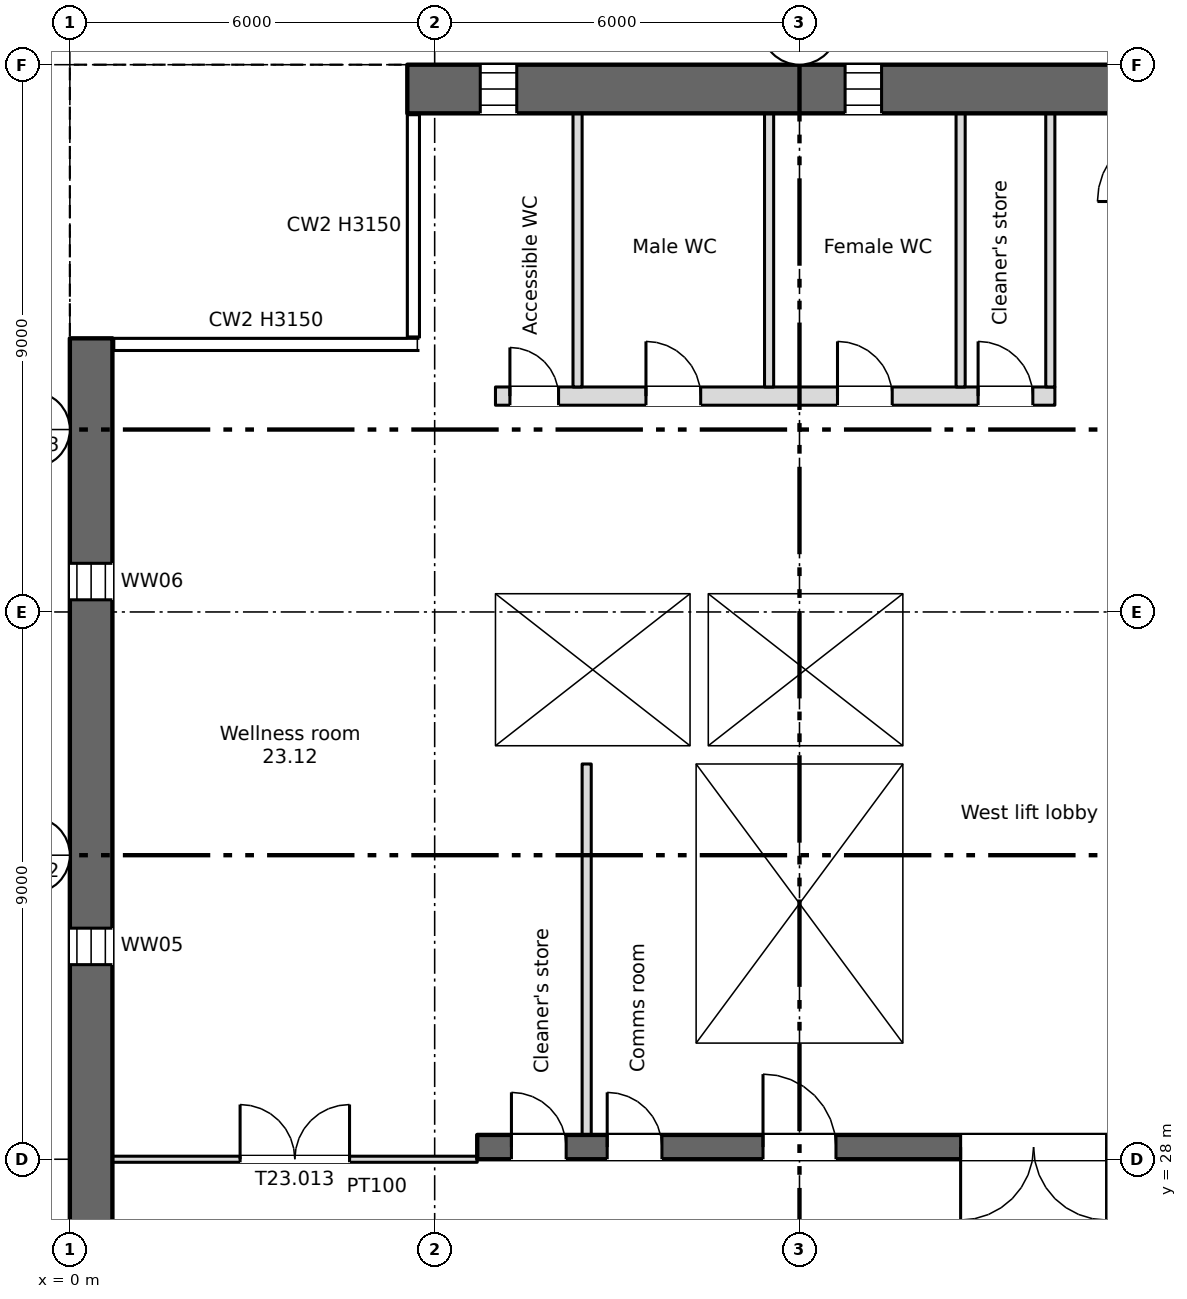
"""IFC4 building model, lengths in metres.
Left out: names, types, materials, properties, quantities, classifications, styles, units other than length and angle.
Written with IfcOpenShell. Run it as: python <this file> out.ifc"""

import sys

from ifc_helpers import new_model, si_unit, direction, frame, frame_2d, origin, place, context, subcontext, project, spatial, rectangle, extrude, element, fill, save


model = new_model("IFC4")
c1 = context("Model", 3, precision=1e-05, world=origin(), true_north=direction((0.0, 1.0)))
c2 = subcontext(c1, "Body", "Model", "MODEL_VIEW")
j1 = project(units=[si_unit("LENGTHUNIT", "METRE"), si_unit("PLANEANGLEUNIT", "RADIAN")], contexts=[c1])
p1 = place(None, origin())
s1 = spatial("IfcSite", under=j1, at=p1, CompositionType="ELEMENT")
p2 = place(p1, origin())
s2 = spatial("IfcBuilding", under=s1, at=p2, CompositionType="ELEMENT")
p3 = place(p2, frame((0.0, 0.0, 155.0)))
s3 = spatial("IfcBuildingStorey", under=s2, at=p3, CompositionType="ELEMENT", Elevation=155.0)
p4 = place(p3, frame((0.35, 6.0, 0.0), z_axis=(0.0, 0.0, 1.0), x_axis=(0.0, 1.0, 0.0)))
e1 = element("IfcWall", 1, at=p4, inside=s3, PredefinedType="SHEAR", context=c2, shape_type="SweptSolid", body=[
    extrude(rectangle(XDim=35.5, YDim=0.7, at=frame_2d((17.75, 0.0))), origin(), (0.0, 0.0, 1.0), 3.15),
])
p5 = place(p4, frame((1.2, 0.0, 0.6)))
e2 = element("IfcOpeningElement", 2, at=p5, cuts=e1, PredefinedType="OPENING", context=c2, shape_type="SweptSolid", body=[
    extrude(rectangle(XDim=0.6, YDim=2.4, at=frame_2d((0.3, 1.2))), frame((0.0, 0.36, 0.0), z_axis=(0.0, -1.0, 0.0), x_axis=(1.0, 0.0, 0.0)), (0.0, 0.0, 1.0), 0.72),
])
p6 = place(p4, frame((7.2, 0.0, 0.6)))
e3 = element("IfcOpeningElement", 3, at=p6, cuts=e1, PredefinedType="OPENING", context=c2, shape_type="SweptSolid", body=[
    extrude(rectangle(XDim=0.6, YDim=2.4, at=frame_2d((0.3, 1.2))), frame((0.0, 0.36, 0.0), z_axis=(0.0, -1.0, 0.0), x_axis=(1.0, 0.0, 0.0)), (0.0, 0.0, 1.0), 0.72),
])
p7 = place(p4, frame((13.2, 0.0, 0.6)))
e4 = element("IfcOpeningElement", 4, at=p7, cuts=e1, PredefinedType="OPENING", context=c2, shape_type="SweptSolid", body=[
    extrude(rectangle(XDim=0.6, YDim=2.4, at=frame_2d((0.3, 1.2))), frame((0.0, 0.36, 0.0), z_axis=(0.0, -1.0, 0.0), x_axis=(1.0, 0.0, 0.0)), (0.0, 0.0, 1.0), 0.72),
])
p8 = place(p4, frame((19.2, 0.0, 0.6)))
e5 = element("IfcOpeningElement", 5, at=p8, cuts=e1, PredefinedType="OPENING", context=c2, shape_type="SweptSolid", body=[
    extrude(rectangle(XDim=0.6, YDim=2.4, at=frame_2d((0.3, 1.2))), frame((0.0, 0.36, 0.0), z_axis=(0.0, -1.0, 0.0), x_axis=(1.0, 0.0, 0.0)), (0.0, 0.0, 1.0), 0.72),
])
p9 = place(p4, frame((25.2, 0.0, 0.6)))
e6 = element("IfcOpeningElement", 6, at=p9, cuts=e1, PredefinedType="OPENING", context=c2, shape_type="SweptSolid", body=[
    extrude(rectangle(XDim=0.6, YDim=2.4, at=frame_2d((0.3, 1.2))), frame((0.0, 0.36, 0.0), z_axis=(0.0, -1.0, 0.0), x_axis=(1.0, 0.0, 0.0)), (0.0, 0.0, 1.0), 0.72),
])
p10 = place(p4, frame((31.2, 0.0, 0.6)))
e7 = element("IfcOpeningElement", 7, at=p10, cuts=e1, PredefinedType="OPENING", context=c2, shape_type="SweptSolid", body=[
    extrude(rectangle(XDim=0.6, YDim=2.4, at=frame_2d((0.3, 1.2))), frame((0.0, 0.36, 0.0), z_axis=(0.0, -1.0, 0.0), x_axis=(1.0, 0.0, 0.0)), (0.0, 0.0, 1.0), 0.72),
])
p11 = place(p3, frame((5.55, 45.6, 0.0), z_axis=(0.0, 0.0, 1.0), x_axis=(1.0, 0.0, 0.0)))
e8 = element("IfcWall", 8, at=p11, inside=s3, PredefinedType="SHEAR", context=c2, shape_type="SweptSolid", body=[
    extrude(rectangle(XDim=60.9, YDim=0.8, at=frame_2d((30.45, 0.0))), origin(), (0.0, 0.0, 1.0), 3.15),
])
p12 = place(p11, frame((1.2, 0.0, 0.6)))
e9 = element("IfcOpeningElement", 9, at=p12, cuts=e8, PredefinedType="OPENING", context=c2, shape_type="SweptSolid", body=[
    extrude(rectangle(XDim=0.6, YDim=2.4, at=frame_2d((0.3, 1.2))), frame((0.0, 0.41, 0.0), z_axis=(0.0, -1.0, 0.0), x_axis=(1.0, 0.0, 0.0)), (0.0, 0.0, 1.0), 0.82),
])
p13 = place(p11, frame((7.2, 0.0, 0.6)))
e10 = element("IfcOpeningElement", 10, at=p13, cuts=e8, PredefinedType="OPENING", context=c2, shape_type="SweptSolid", body=[
    extrude(rectangle(XDim=0.6, YDim=2.4, at=frame_2d((0.3, 1.2))), frame((0.0, 0.41, 0.0), z_axis=(0.0, -1.0, 0.0), x_axis=(1.0, 0.0, 0.0)), (0.0, 0.0, 1.0), 0.82),
])
p14 = place(p3, frame((6.7, 28.2, 0.0), z_axis=(0.0, 0.0, 1.0), x_axis=(1.0, 0.0, 0.0)))
e11 = element("IfcWall", 11, at=p14, inside=s3, PredefinedType="SHEAR", context=c2, shape_type="SweptSolid", body=[
    extrude(rectangle(XDim=57.8, YDim=0.4, at=frame_2d((28.9, 0.0))), origin(), (0.0, 0.0, 1.0), 3.15),
])
p15 = place(p14, frame((12.562, 0.0, 0.0)))
e12 = element("IfcOpeningElement", 12, at=p15, cuts=e11, PredefinedType="OPENING", context=c2, shape_type="SweptSolid", body=[
    extrude(rectangle(XDim=0.9, YDim=2.1, at=frame_2d((0.45, 1.05))), frame((0.0, 0.21, 0.0), z_axis=(0.0, -1.0, 0.0), x_axis=(1.0, 0.0, 0.0)), (0.0, 0.0, 1.0), 0.42),
])
p16 = place(p14, frame((15.137, 0.0, 0.0)))
e13 = element("IfcOpeningElement", 13, at=p16, cuts=e11, PredefinedType="OPENING", context=c2, shape_type="SweptSolid", body=[
    extrude(rectangle(XDim=0.9, YDim=2.1, at=frame_2d((0.45, 1.05))), frame((0.0, 0.21, 0.0), z_axis=(0.0, -1.0, 0.0), x_axis=(1.0, 0.0, 0.0)), (0.0, 0.0, 1.0), 0.42),
])
p17 = place(p14, frame((49.85, 0.0, 0.0)))
e14 = element("IfcOpeningElement", 14, at=p17, cuts=e11, PredefinedType="OPENING", context=c2, shape_type="SweptSolid", body=[
    extrude(rectangle(XDim=0.9, YDim=2.1, at=frame_2d((0.45, 1.05))), frame((0.0, 0.21, 0.0), z_axis=(0.0, -1.0, 0.0), x_axis=(1.0, 0.0, 0.0)), (0.0, 0.0, 1.0), 0.42),
])
p18 = place(p14, frame((0.562, 0.0, 0.0)))
e15 = element("IfcOpeningElement", 15, at=p18, cuts=e11, PredefinedType="OPENING", context=c2, shape_type="SweptSolid", body=[
    extrude(rectangle(XDim=0.9, YDim=2.1, at=frame_2d((0.45, 1.05))), frame((0.0, 0.21, 0.0), z_axis=(0.0, -1.0, 0.0), x_axis=(1.0, 0.0, 0.0)), (0.0, 0.0, 1.0), 0.42),
])
p19 = place(p14, frame((2.137, 0.0, 0.0)))
e16 = element("IfcOpeningElement", 16, at=p19, cuts=e11, PredefinedType="OPENING", context=c2, shape_type="SweptSolid", body=[
    extrude(rectangle(XDim=0.9, YDim=2.1, at=frame_2d((0.45, 1.05))), frame((0.0, 0.21, 0.0), z_axis=(0.0, -1.0, 0.0), x_axis=(1.0, 0.0, 0.0)), (0.0, 0.0, 1.0), 0.42),
])
p20 = place(p14, frame((4.7, 0.0, 0.0)))
e17 = element("IfcOpeningElement", 17, at=p20, cuts=e11, PredefinedType="OPENING", context=c2, shape_type="SweptSolid", body=[
    extrude(rectangle(XDim=1.2, YDim=2.1, at=frame_2d((0.6, 1.05))), frame((0.0, 0.21, 0.0), z_axis=(0.0, -1.0, 0.0), x_axis=(1.0, 0.0, 0.0)), (0.0, 0.0, 1.0), 0.42),
])
p21 = place(p14, frame((31.7, 0.0, 0.0)))
e18 = element("IfcOpeningElement", 18, at=p21, cuts=e11, PredefinedType="OPENING", context=c2, shape_type="SweptSolid", body=[
    extrude(rectangle(XDim=1.2, YDim=2.1, at=frame_2d((0.6, 1.05))), frame((0.0, 0.21, 0.0), z_axis=(0.0, -1.0, 0.0), x_axis=(1.0, 0.0, 0.0)), (0.0, 0.0, 1.0), 0.42),
])
p22 = place(p14, frame((55.2, 0.0, 0.0)))
e19 = element("IfcOpeningElement", 19, at=p22, cuts=e11, PredefinedType="OPENING", context=c2, shape_type="SweptSolid", body=[
    extrude(rectangle(XDim=1.2, YDim=2.1, at=frame_2d((0.6, 1.05))), frame((0.0, 0.21, 0.0), z_axis=(0.0, -1.0, 0.0), x_axis=(1.0, 0.0, 0.0)), (0.0, 0.0, 1.0), 0.42),
])
p23 = place(p14, frame((21.7, 0.0, 0.0)))
e20 = element("IfcOpeningElement", 20, at=p23, cuts=e11, PredefinedType="OPENING", context=c2, shape_type="SweptSolid", body=[
    extrude(rectangle(XDim=1.2, YDim=2.1, at=frame_2d((0.6, 1.05))), frame((0.0, 0.21, 0.0), z_axis=(0.0, -1.0, 0.0), x_axis=(1.0, 0.0, 0.0)), (0.0, 0.0, 1.0), 0.42),
])
p24 = place(p14, frame((41.7, 0.0, 0.0)))
e21 = element("IfcOpeningElement", 21, at=p24, cuts=e11, PredefinedType="OPENING", context=c2, shape_type="SweptSolid", body=[
    extrude(rectangle(XDim=1.2, YDim=2.1, at=frame_2d((0.6, 1.05))), frame((0.0, 0.21, 0.0), z_axis=(0.0, -1.0, 0.0), x_axis=(1.0, 0.0, 0.0)), (0.0, 0.0, 1.0), 0.42),
])
p25 = place(p14, frame((24.85, 0.0, 0.0)))
e22 = element("IfcOpeningElement", 22, at=p25, cuts=e11, PredefinedType="OPENING", context=c2, shape_type="SweptSolid", body=[
    extrude(rectangle(XDim=2.4, YDim=2.1, at=frame_2d((1.2, 1.05))), frame((0.0, 0.21, 0.0), z_axis=(0.0, -1.0, 0.0), x_axis=(1.0, 0.0, 0.0)), (0.0, 0.0, 1.0), 0.42),
])
p26 = place(p14, frame((37.35, 0.0, 0.0)))
e23 = element("IfcOpeningElement", 23, at=p26, cuts=e11, PredefinedType="OPENING", context=c2, shape_type="SweptSolid", body=[
    extrude(rectangle(XDim=2.4, YDim=2.1, at=frame_2d((1.2, 1.05))), frame((0.0, 0.21, 0.0), z_axis=(0.0, -1.0, 0.0), x_axis=(1.0, 0.0, 0.0)), (0.0, 0.0, 1.0), 0.42),
])
p27 = place(p14, frame((7.95, 0.0, 0.0)))
e24 = element("IfcOpeningElement", 24, at=p27, cuts=e11, PredefinedType="OPENING", context=c2, shape_type="SweptSolid", body=[
    extrude(rectangle(XDim=2.4, YDim=2.1, at=frame_2d((1.2, 1.05))), frame((0.0, 0.21, 0.0), z_axis=(0.0, -1.0, 0.0), x_axis=(1.0, 0.0, 0.0)), (0.0, 0.0, 1.0), 0.42),
])
p28 = place(p14, frame((28.85, 0.0, 0.0)))
e25 = element("IfcOpeningElement", 25, at=p28, cuts=e11, PredefinedType="OPENING", context=c2, shape_type="SweptSolid", body=[
    extrude(rectangle(XDim=0.9, YDim=2.1, at=frame_2d((0.45, 1.05))), frame((0.0, 0.21, 0.0), z_axis=(0.0, -1.0, 0.0), x_axis=(1.0, 0.0, 0.0)), (0.0, 0.0, 1.0), 0.42),
])
p29 = place(p14, frame((34.85, 0.0, 0.0)))
e26 = element("IfcOpeningElement", 26, at=p29, cuts=e11, PredefinedType="OPENING", context=c2, shape_type="SweptSolid", body=[
    extrude(rectangle(XDim=0.9, YDim=2.1, at=frame_2d((0.45, 1.05))), frame((0.0, 0.21, 0.0), z_axis=(0.0, -1.0, 0.0), x_axis=(1.0, 0.0, 0.0)), (0.0, 0.0, 1.0), 0.42),
])
p30 = place(p3, frame((6.85, 28.4, 0.0), z_axis=(0.0, 0.0, 1.0), x_axis=(0.0, 1.0, 0.0)))
e27 = element("IfcWall", 27, at=p30, inside=s3, PredefinedType="SHEAR", context=c2, shape_type="SweptSolid", body=[
    extrude(rectangle(XDim=16.8, YDim=0.3, at=frame_2d((8.4, 0.0))), origin(), (0.0, 0.0, 1.0), 3.15),
])
for number, where, z_axis, x_axis in (
    (28, (10.15, 28.4, 0.0), (0.0, 0.0, 1.0), (0.0, 1.0, 0.0)),
    (29, (13.85, 28.4, 0.0), (0.0, 0.0, 1.0), (0.0, 1.0, 0.0)),
):
    element("IfcWall", number, at=place(p3, frame(where, z_axis=z_axis, x_axis=x_axis)), inside=s3, PredefinedType="SHEAR", context=c2, shape_type="SweptSolid", body=[
        extrude(rectangle(XDim=6.1, YDim=0.3, at=frame_2d((3.05, 0.0))), origin(), (0.0, 0.0, 1.0), 3.15),
    ])
for number, where, z_axis, x_axis in (
    (30, (7.0, 34.65, 0.0), (0.0, 0.0, 1.0), (1.0, 0.0, 0.0)),
    (31, (7.0, 37.45, 0.0), (0.0, 0.0, 1.0), (1.0, 0.0, 0.0)),
):
    element("IfcWall", number, at=place(p3, frame(where, z_axis=z_axis, x_axis=x_axis)), inside=s3, PredefinedType="SHEAR", context=c2, shape_type="SweptSolid", body=[
        extrude(rectangle(XDim=7.0, YDim=0.3, at=frame_2d((3.5, 0.0))), origin(), (0.0, 0.0, 1.0), 3.15),
    ])
p31 = place(p3, frame((13.85, 34.8, 0.0), z_axis=(0.0, 0.0, 1.0), x_axis=(0.0, 1.0, 0.0)))
e32 = element("IfcWall", 32, at=p31, inside=s3, PredefinedType="SHEAR", context=c2, shape_type="SweptSolid", body=[
    extrude(rectangle(XDim=2.5, YDim=0.3, at=frame_2d((1.25, 0.0))), origin(), (0.0, 0.0, 1.0), 3.15),
])
p32 = place(p3, frame((7.0, 40.55, 0.0), z_axis=(0.0, 0.0, 1.0), x_axis=(1.0, 0.0, 0.0)))
e33 = element("IfcWall", 33, at=p32, inside=s3, PredefinedType="PARTITIONING", context=c2, shape_type="SweptSolid", body=[
    extrude(rectangle(XDim=9.2, YDim=0.3, at=frame_2d((4.6, 0.0))), origin(), (0.0, 0.0, 1.0), 3.15),
])
p33 = place(p32, frame((0.238, 0.0, 0.0)))
e34 = element("IfcOpeningElement", 34, at=p33, cuts=e33, PredefinedType="OPENING", context=c2, shape_type="SweptSolid", body=[
    extrude(rectangle(XDim=0.8, YDim=2.1, at=frame_2d((0.4, 1.05))), frame((0.0, 0.16, 0.0), z_axis=(0.0, -1.0, 0.0), x_axis=(1.0, 0.0, 0.0)), (0.0, 0.0, 1.0), 0.32),
])
p34 = place(p32, frame((2.475, 0.0, 0.0)))
e35 = element("IfcOpeningElement", 35, at=p34, cuts=e33, PredefinedType="OPENING", context=c2, shape_type="SweptSolid", body=[
    extrude(rectangle(XDim=0.9, YDim=2.1, at=frame_2d((0.45, 1.05))), frame((0.0, 0.16, 0.0), z_axis=(0.0, -1.0, 0.0), x_axis=(1.0, 0.0, 0.0)), (0.0, 0.0, 1.0), 0.32),
])
p35 = place(p32, frame((5.625, 0.0, 0.0)))
e36 = element("IfcOpeningElement", 36, at=p35, cuts=e33, PredefinedType="OPENING", context=c2, shape_type="SweptSolid", body=[
    extrude(rectangle(XDim=0.9, YDim=2.1, at=frame_2d((0.45, 1.05))), frame((0.0, 0.16, 0.0), z_axis=(0.0, -1.0, 0.0), x_axis=(1.0, 0.0, 0.0)), (0.0, 0.0, 1.0), 0.32),
])
p36 = place(p32, frame((7.938, 0.0, 0.0)))
e37 = element("IfcOpeningElement", 37, at=p36, cuts=e33, PredefinedType="OPENING", context=c2, shape_type="SweptSolid", body=[
    extrude(rectangle(XDim=0.9, YDim=2.1, at=frame_2d((0.45, 1.05))), frame((0.0, 0.16, 0.0), z_axis=(0.0, -1.0, 0.0), x_axis=(1.0, 0.0, 0.0)), (0.0, 0.0, 1.0), 0.32),
])
p37 = place(p3, frame((10.35, 34.8, 0.0), z_axis=(0.0, 0.0, 1.0), x_axis=(0.0, 1.0, 0.0)))
e38 = element("IfcWall", 38, at=p37, inside=s3, PredefinedType="SHEAR", context=c2, shape_type="SweptSolid", body=[
    extrude(rectangle(XDim=2.5, YDim=0.3, at=frame_2d((1.25, 0.0))), origin(), (0.0, 0.0, 1.0), 3.15),
])
p38 = place(p3, frame((16.125, 40.7, 0.0), z_axis=(0.0, 0.0, 1.0), x_axis=(0.0, 1.0, 0.0)))
e39 = element("IfcWall", 39, at=p38, inside=s3, PredefinedType="PARTITIONING", context=c2, shape_type="SweptSolid", body=[
    extrude(rectangle(XDim=4.5, YDim=0.15, at=frame_2d((2.25, 0.0))), origin(), (0.0, 0.0, 1.0), 3.15),
])
p39 = place(p3, frame((8.5, 28.4, 0.0), z_axis=(0.0, 0.0, 1.0), x_axis=(0.0, 1.0, 0.0)))
e40 = element("IfcWall", 40, at=p39, inside=s3, PredefinedType="PARTITIONING", context=c2, shape_type="SweptSolid", body=[
    extrude(rectangle(XDim=6.1, YDim=0.15, at=frame_2d((3.05, 0.0))), origin(), (0.0, 0.0, 1.0), 3.15),
])
for number, where, z_axis, x_axis in (
    (41, (8.35, 40.7, 0.0), (0.0, 0.0, 1.0), (0.0, 1.0, 0.0)),
    (42, (11.5, 40.7, 0.0), (0.0, 0.0, 1.0), (0.0, 1.0, 0.0)),
    (43, (14.65, 40.7, 0.0), (0.0, 0.0, 1.0), (0.0, 1.0, 0.0)),
):
    element("IfcWall", number, at=place(p3, frame(where, z_axis=z_axis, x_axis=x_axis)), inside=s3, PredefinedType="PARTITIONING", context=c2, shape_type="SweptSolid", body=[
        extrude(rectangle(XDim=4.5, YDim=0.15, at=frame_2d((2.25, 0.0))), origin(), (0.0, 0.0, 1.0), 3.15),
    ])
p40 = place(p3, frame((0.7, 28.0, 0.0), z_axis=(0.0, 0.0, 1.0), x_axis=(1.0, 0.0, 0.0)))
e44 = element("IfcWall", 44, at=p40, inside=s3, PredefinedType="PARTITIONING", context=c2, shape_type="SweptSolid", body=[
    extrude(rectangle(XDim=6.0, YDim=0.1, at=frame_2d((3.0, 0.0))), origin(), (0.0, 0.0, 1.0), 3.15),
])
p41 = place(p40, frame((2.1, 0.0, 0.0)))
e45 = element("IfcOpeningElement", 45, at=p41, cuts=e44, PredefinedType="OPENING", context=c2, shape_type="SweptSolid", body=[
    extrude(rectangle(XDim=1.8, YDim=2.1, at=frame_2d((0.9, 1.05))), frame((0.0, 0.06, 0.0), z_axis=(0.0, -1.0, 0.0), x_axis=(1.0, 0.0, 0.0)), (0.0, 0.0, 1.0), 0.12),
])
p42 = place(p12, origin())
e46 = element("IfcWindow", 46, at=p42, inside=s3, PartitioningType="SINGLE_PANEL", PredefinedType="WINDOW", context=c2, shape_type="SweptSolid", body=[
    extrude(rectangle(XDim=0.6, YDim=2.4, at=frame_2d((0.3, 1.2))), frame((0.0, 0.03, 0.0), z_axis=(0.0, -1.0, 0.0), x_axis=(1.0, 0.0, 0.0)), (0.0, 0.0, 1.0), 0.06),
])
fill(e9, e46)
p43 = place(p13, origin())
e47 = element("IfcWindow", 47, at=p43, inside=s3, PartitioningType="SINGLE_PANEL", PredefinedType="WINDOW", context=c2, shape_type="SweptSolid", body=[
    extrude(rectangle(XDim=0.6, YDim=2.4, at=frame_2d((0.3, 1.2))), frame((0.0, 0.03, 0.0), z_axis=(0.0, -1.0, 0.0), x_axis=(1.0, 0.0, 0.0)), (0.0, 0.0, 1.0), 0.06),
])
fill(e10, e47)
p44 = place(p9, origin())
e48 = element("IfcWindow", 48, at=p44, inside=s3, PartitioningType="SINGLE_PANEL", PredefinedType="WINDOW", context=c2, shape_type="SweptSolid", body=[
    extrude(rectangle(XDim=0.6, YDim=2.4, at=frame_2d((0.3, 1.2))), frame((0.0, 0.03, 0.0), z_axis=(0.0, -1.0, 0.0), x_axis=(1.0, 0.0, 0.0)), (0.0, 0.0, 1.0), 0.06),
])
fill(e6, e48)
p45 = place(p10, origin())
e49 = element("IfcWindow", 49, at=p45, inside=s3, PartitioningType="SINGLE_PANEL", PredefinedType="WINDOW", context=c2, shape_type="SweptSolid", body=[
    extrude(rectangle(XDim=0.6, YDim=2.4, at=frame_2d((0.3, 1.2))), frame((0.0, 0.03, 0.0), z_axis=(0.0, -1.0, 0.0), x_axis=(1.0, 0.0, 0.0)), (0.0, 0.0, 1.0), 0.06),
])
fill(e7, e49)
p46 = place(p18, origin())
e50 = element("IfcDoor", 50, at=p46, inside=s3, OperationType="SINGLE_SWING_LEFT", PredefinedType="DOOR", context=c2, shape_type="SweptSolid", body=[
    extrude(rectangle(XDim=0.9, YDim=2.1, at=frame_2d((0.45, 1.05))), frame((0.0, 0.025, 0.0), z_axis=(0.0, -1.0, 0.0), x_axis=(1.0, 0.0, 0.0)), (0.0, 0.0, 1.0), 0.05),
])
fill(e15, e50)
p47 = place(p19, origin())
e51 = element("IfcDoor", 51, at=p47, inside=s3, OperationType="SINGLE_SWING_LEFT", PredefinedType="DOOR", context=c2, shape_type="SweptSolid", body=[
    extrude(rectangle(XDim=0.9, YDim=2.1, at=frame_2d((0.45, 1.05))), frame((0.0, 0.025, 0.0), z_axis=(0.0, -1.0, 0.0), x_axis=(1.0, 0.0, 0.0)), (0.0, 0.0, 1.0), 0.05),
])
fill(e16, e51)
p48 = place(p33, origin())
e52 = element("IfcDoor", 52, at=p48, inside=s3, OperationType="SINGLE_SWING_LEFT", PredefinedType="DOOR", context=c2, shape_type="SweptSolid", body=[
    extrude(rectangle(XDim=0.8, YDim=2.1, at=frame_2d((0.4, 1.05))), frame((0.0, 0.025, 0.0), z_axis=(0.0, -1.0, 0.0), x_axis=(1.0, 0.0, 0.0)), (0.0, 0.0, 1.0), 0.05),
])
fill(e34, e52)
p49 = place(p34, origin())
e53 = element("IfcDoor", 53, at=p49, inside=s3, OperationType="SINGLE_SWING_LEFT", PredefinedType="DOOR", context=c2, shape_type="SweptSolid", body=[
    extrude(rectangle(XDim=0.9, YDim=2.1, at=frame_2d((0.45, 1.05))), frame((0.0, 0.025, 0.0), z_axis=(0.0, -1.0, 0.0), x_axis=(1.0, 0.0, 0.0)), (0.0, 0.0, 1.0), 0.05),
])
fill(e35, e53)
p50 = place(p35, origin())
e54 = element("IfcDoor", 54, at=p50, inside=s3, OperationType="SINGLE_SWING_LEFT", PredefinedType="DOOR", context=c2, shape_type="SweptSolid", body=[
    extrude(rectangle(XDim=0.9, YDim=2.1, at=frame_2d((0.45, 1.05))), frame((0.0, 0.025, 0.0), z_axis=(0.0, -1.0, 0.0), x_axis=(1.0, 0.0, 0.0)), (0.0, 0.0, 1.0), 0.05),
])
fill(e36, e54)
p51 = place(p36, origin())
e55 = element("IfcDoor", 55, at=p51, inside=s3, OperationType="SINGLE_SWING_LEFT", PredefinedType="DOOR", context=c2, shape_type="SweptSolid", body=[
    extrude(rectangle(XDim=0.9, YDim=2.1, at=frame_2d((0.45, 1.05))), frame((0.0, 0.025, 0.0), z_axis=(0.0, -1.0, 0.0), x_axis=(1.0, 0.0, 0.0)), (0.0, 0.0, 1.0), 0.05),
])
fill(e37, e55)
p52 = place(p20, origin())
e56 = element("IfcDoor", 56, at=p52, inside=s3, OperationType="SINGLE_SWING_LEFT", PredefinedType="DOOR", context=c2, shape_type="SweptSolid", body=[
    extrude(rectangle(XDim=1.2, YDim=2.1, at=frame_2d((0.6, 1.05))), frame((0.0, 0.025, 0.0), z_axis=(0.0, -1.0, 0.0), x_axis=(1.0, 0.0, 0.0)), (0.0, 0.0, 1.0), 0.05),
])
fill(e17, e56)
p53 = place(p27, origin())
e57 = element("IfcDoor", 57, at=p53, inside=s3, OperationType="DOUBLE_DOOR_SINGLE_SWING", PredefinedType="DOOR", context=c2, shape_type="SweptSolid", body=[
    extrude(rectangle(XDim=2.4, YDim=2.1, at=frame_2d((1.2, 1.05))), frame((0.0, 0.025, 0.0), z_axis=(0.0, -1.0, 0.0), x_axis=(1.0, 0.0, 0.0)), (0.0, 0.0, 1.0), 0.05),
])
fill(e24, e57)
p54 = place(p41, origin())
e58 = element("IfcDoor", 58, at=p54, inside=s3, OperationType="DOUBLE_DOOR_SINGLE_SWING", PredefinedType="DOOR", context=c2, shape_type="SweptSolid", body=[
    extrude(rectangle(XDim=1.8, YDim=2.1, at=frame_2d((0.9, 1.05))), frame((0.0, 0.025, 0.0), z_axis=(0.0, -1.0, 0.0), x_axis=(1.0, 0.0, 0.0)), (0.0, 0.0, 1.0), 0.05),
])
fill(e45, e58)
save(model, sys.argv[1])
